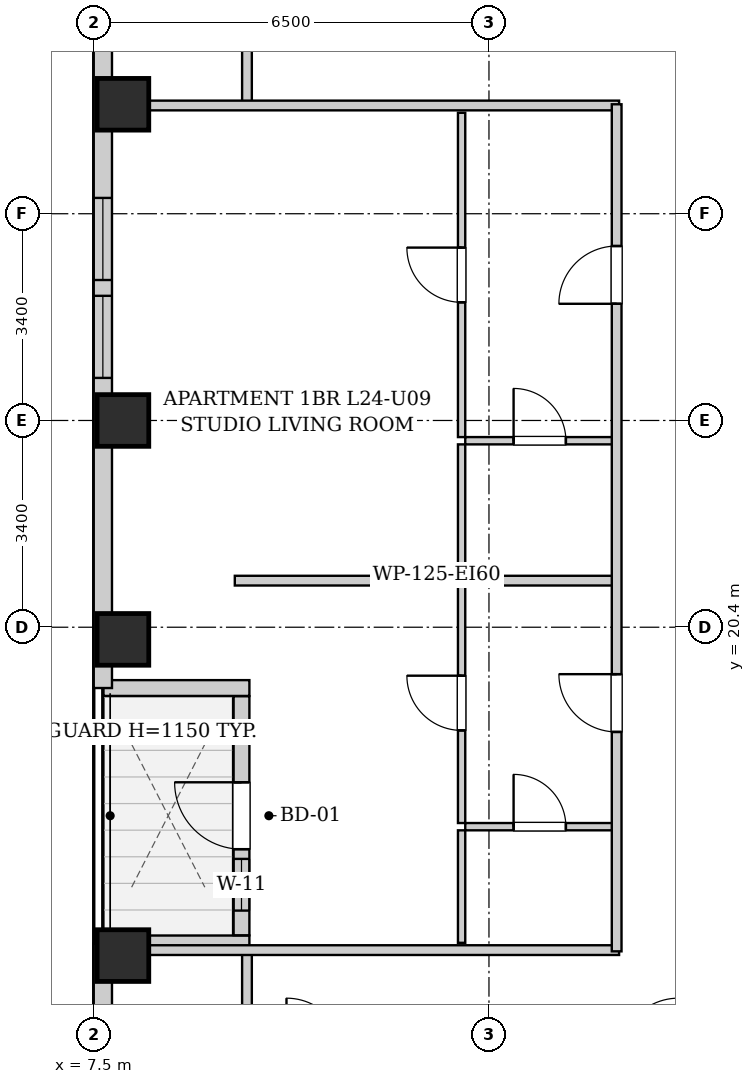
"""IFC4 building model, lengths in metres.
Left out: names, types, materials, properties, quantities, classifications, styles, units other than length and angle.
Written with IfcOpenShell. Run it as: python <this file> out.ifc"""

import sys

from ifc_helpers import new_model, si_unit, direction, frame, frame_2d, origin, origin_2d, place, context, subcontext, project, spatial, rectangle, extrude, element, fill, save


model = new_model("IFC4")
c1 = context("Model", 3, precision=1e-05, world=origin(), true_north=direction((0.0, 1.0)))
c2 = subcontext(c1, "Body", "Model", "MODEL_VIEW")
j1 = project(units=[si_unit("LENGTHUNIT", "METRE"), si_unit("PLANEANGLEUNIT", "RADIAN")], contexts=[c1])
p1 = place(None, origin())
s1 = spatial("IfcSite", under=j1, at=p1, CompositionType="ELEMENT")
p2 = place(p1, origin())
s2 = spatial("IfcBuilding", under=s1, at=p2, CompositionType="ELEMENT")
p3 = place(p2, frame((0.0, 0.0, 87.9)))
s3 = spatial("IfcBuildingStorey", under=s2, at=p3, CompositionType="ELEMENT", Elevation=87.9)
for number, where, z_axis, x_axis in (
    (1, (7.98, 15.0, 0.0), (0.0, 0.0, 1.0), (1.0, 0.0, 0.0)),
    (2, (7.98, 20.2, 0.0), (0.0, 0.0, 1.0), (1.0, 0.0, 0.0)),
    (3, (7.98, 23.8, 0.0), (0.0, 0.0, 1.0), (1.0, 0.0, 0.0)),
    (4, (7.98, 29.0, 0.0), (0.0, 0.0, 1.0), (1.0, 0.0, 0.0)),
):
    element("IfcColumn", number, at=place(p3, frame(where, z_axis=z_axis, x_axis=x_axis)), inside=s3, PredefinedType="COLUMN", context=c2, shape_type="SweptSolid", body=[
        extrude(rectangle(XDim=0.85, YDim=0.85, at=origin_2d()), origin(), (0.0, 0.0, 1.0), 3.2),
    ])
p4 = place(p3, frame((7.65, 2.5, 0.0), z_axis=(0.0, 0.0, 1.0), x_axis=(0.0, 1.0, 0.0)))
e5 = element("IfcWall", 5, at=p4, inside=s3, PredefinedType="SOLIDWALL", context=c2, shape_type="SweptSolid", body=[
    extrude(rectangle(XDim=12.7, YDim=0.3, at=frame_2d((6.35, 0.0))), origin(), (0.0, 0.0, 1.0), 2.94),
])
p5 = place(p4, frame((3.482, 0.0, 0.55)))
e6 = element("IfcOpeningElement", 6, at=p5, cuts=e5, PredefinedType="OPENING", context=c2, shape_type="SweptSolid", body=[
    extrude(rectangle(XDim=1.35, YDim=1.2, at=frame_2d((0.675, 0.6))), frame((0.0, 0.16, 0.0), z_axis=(0.0, -1.0, 0.0), x_axis=(1.0, 0.0, 0.0)), (0.0, 0.0, 1.0), 0.32),
])
p6 = place(p4, frame((1.135, 0.0, 0.55)))
e7 = element("IfcOpeningElement", 7, at=p6, cuts=e5, PredefinedType="OPENING", context=c2, shape_type="SweptSolid", body=[
    extrude(rectangle(XDim=1.35, YDim=1.2, at=frame_2d((0.675, 0.6))), frame((0.0, 0.16, 0.0), z_axis=(0.0, -1.0, 0.0), x_axis=(1.0, 0.0, 0.0)), (0.0, 0.0, 1.0), 0.32),
])
p7 = place(p3, frame((7.66, 15.2, 0.0), z_axis=(0.0, 0.0, 1.0), x_axis=(1.0, 0.0, 0.0)))
e8 = element("IfcWall", 8, at=p7, inside=s3, PredefinedType="SOLIDWALL", context=c2, shape_type="SweptSolid", body=[
    extrude(rectangle(XDim=2.4, YDim=0.26, at=frame_2d((1.2, 0.0))), origin(), (0.0, 0.0, 1.0), 2.94),
])
p8 = place(p3, frame((9.93, 15.334, 0.0), z_axis=(0.0, 0.0, 1.0), x_axis=(0.0, 1.0, 0.0)))
e9 = element("IfcWall", 9, at=p8, inside=s3, PredefinedType="SOLIDWALL", context=c2, shape_type="SweptSolid", body=[
    extrude(rectangle(XDim=3.932, YDim=0.26, at=frame_2d((1.966, 0.0))), origin(), (0.0, 0.0, 1.0), 2.94),
])
p9 = place(p8, frame((1.416, 0.0, 0.0)))
e10 = element("IfcOpeningElement", 10, at=p9, cuts=e9, PredefinedType="OPENING", context=c2, shape_type="SweptSolid", body=[
    extrude(rectangle(XDim=1.1, YDim=2.0, at=frame_2d((0.55, 1.0))), frame((0.0, 0.14, 0.0), z_axis=(0.0, -1.0, 0.0), x_axis=(1.0, 0.0, 0.0)), (0.0, 0.0, 1.0), 0.28),
])
p10 = place(p8, frame((0.406, 0.0, 0.55)))
e11 = element("IfcOpeningElement", 11, at=p10, cuts=e9, PredefinedType="OPENING", context=c2, shape_type="SweptSolid", body=[
    extrude(rectangle(XDim=0.85, YDim=1.2, at=frame_2d((0.425, 0.6))), frame((0.0, 0.14, 0.0), z_axis=(0.0, -1.0, 0.0), x_axis=(1.0, 0.0, 0.0)), (0.0, 0.0, 1.0), 0.28),
])
p11 = place(p3, frame((10.06, 19.4, 0.0), z_axis=(0.0, 0.0, 1.0), x_axis=(-1.0, 0.0, 0.0)))
e12 = element("IfcWall", 12, at=p11, inside=s3, PredefinedType="SOLIDWALL", context=c2, shape_type="SweptSolid", body=[
    extrude(rectangle(XDim=2.4, YDim=0.26, at=frame_2d((1.2, 0.0))), origin(), (0.0, 0.0, 1.0), 2.94),
])
p12 = place(p3, frame((7.65, 19.4, 0.0), z_axis=(0.0, 0.0, 1.0), x_axis=(0.0, 1.0, 0.0)))
e13 = element("IfcWall", 13, at=p12, inside=s3, PredefinedType="SOLIDWALL", context=c2, shape_type="SweptSolid", body=[
    extrude(rectangle(XDim=21.4, YDim=0.3, at=frame_2d((10.7, 0.0))), origin(), (0.0, 0.0, 1.0), 2.94),
])
p13 = place(p12, frame((16.957, 0.0, 0.55)))
e14 = element("IfcOpeningElement", 14, at=p13, cuts=e13, PredefinedType="OPENING", context=c2, shape_type="SweptSolid", body=[
    extrude(rectangle(XDim=1.35, YDim=1.2, at=frame_2d((0.675, 0.6))), frame((0.0, 0.16, 0.0), z_axis=(0.0, -1.0, 0.0), x_axis=(1.0, 0.0, 0.0)), (0.0, 0.0, 1.0), 0.32),
])
p14 = place(p12, frame((15.185, 0.0, 0.55)))
e15 = element("IfcOpeningElement", 15, at=p14, cuts=e13, PredefinedType="OPENING", context=c2, shape_type="SweptSolid", body=[
    extrude(rectangle(XDim=1.35, YDim=1.2, at=frame_2d((0.675, 0.6))), frame((0.0, 0.16, 0.0), z_axis=(0.0, -1.0, 0.0), x_axis=(1.0, 0.0, 0.0)), (0.0, 0.0, 1.0), 0.32),
])
p15 = place(p12, frame((5.1, 0.0, 0.55)))
e16 = element("IfcOpeningElement", 16, at=p15, cuts=e13, PredefinedType="OPENING", context=c2, shape_type="SweptSolid", body=[
    extrude(rectangle(XDim=1.35, YDim=1.2, at=frame_2d((0.675, 0.6))), frame((0.0, 0.16, 0.0), z_axis=(0.0, -1.0, 0.0), x_axis=(1.0, 0.0, 0.0)), (0.0, 0.0, 1.0), 0.32),
])
p16 = place(p12, frame((6.71, 0.0, 0.55)))
e17 = element("IfcOpeningElement", 17, at=p16, cuts=e13, PredefinedType="OPENING", context=c2, shape_type="SweptSolid", body=[
    extrude(rectangle(XDim=1.35, YDim=1.2, at=frame_2d((0.675, 0.6))), frame((0.0, 0.16, 0.0), z_axis=(0.0, -1.0, 0.0), x_axis=(1.0, 0.0, 0.0)), (0.0, 0.0, 1.0), 0.32),
])
for number, where, z_axis, x_axis in (
    (18, (10.02, 13.35, 0.0), (0.0, 0.0, 1.0), (0.0, 1.0, 0.0)),
    (19, (10.02, 28.98, 0.0), (0.0, 0.0, 1.0), (0.0, 1.0, 0.0)),
):
    element("IfcWall", number, at=place(p3, frame(where, z_axis=z_axis, x_axis=x_axis)), inside=s3, PredefinedType="PARTITIONING", context=c2, shape_type="SweptSolid", body=[
        extrude(rectangle(XDim=1.74, YDim=0.16, at=frame_2d((0.87, 0.0))), origin(), (0.0, 0.0, 1.0), 2.94),
    ])
for number, where, z_axis, x_axis in (
    (20, (7.78, 15.09, 0.0), (0.0, 0.0, 1.0), (1.0, 0.0, 0.0)),
    (21, (7.78, 28.98, 0.0), (0.0, 0.0, 1.0), (1.0, 0.0, 0.0)),
):
    element("IfcWall", number, at=place(p3, frame(where, z_axis=z_axis, x_axis=x_axis)), inside=s3, PredefinedType="PARTITIONING", context=c2, shape_type="SweptSolid", body=[
        extrude(rectangle(XDim=8.36, YDim=0.16, at=frame_2d((4.18, 0.0))), origin(), (0.0, 0.0, 1.0), 2.309),
    ])
p17 = place(p3, frame((9.82, 21.166, 0.0), z_axis=(0.0, 0.0, 1.0), x_axis=(1.0, 0.0, 0.0)))
e22 = element("IfcWall", 22, at=p17, inside=s3, PredefinedType="PARTITIONING", context=c2, shape_type="SweptSolid", body=[
    extrude(rectangle(XDim=6.24, YDim=0.16, at=frame_2d((3.12, 0.0))), origin(), (0.0, 0.0, 1.0), 2.94),
])
p18 = place(p3, frame((13.61, 17.12, 0.0), z_axis=(0.0, 0.0, 1.0), x_axis=(1.0, 0.0, 0.0)))
e23 = element("IfcWall", 23, at=p18, inside=s3, PredefinedType="PARTITIONING", context=c2, shape_type="SweptSolid", body=[
    extrude(rectangle(XDim=2.45, YDim=0.12, at=frame_2d((1.225, 0.0))), origin(), (0.0, 0.0, 1.0), 2.94),
])
p19 = place(p18, frame((0.795, 0.0, 0.0)))
e24 = element("IfcOpeningElement", 24, at=p19, cuts=e23, PredefinedType="OPENING", context=c2, shape_type="SweptSolid", body=[
    extrude(rectangle(XDim=0.86, YDim=2.05, at=frame_2d((0.43, 1.025))), frame((0.0, 0.07, 0.0), z_axis=(0.0, -1.0, 0.0), x_axis=(1.0, 0.0, 0.0)), (0.0, 0.0, 1.0), 0.14),
])
p20 = place(p3, frame((13.55, 15.21, 0.0), z_axis=(0.0, 0.0, 1.0), x_axis=(0.0, 1.0, 0.0)))
e25 = element("IfcWall", 25, at=p20, inside=s3, PredefinedType="PARTITIONING", context=c2, shape_type="SweptSolid", body=[
    extrude(rectangle(XDim=1.85, YDim=0.12, at=frame_2d((0.925, 0.0))), origin(), (0.0, 0.0, 1.0), 2.94),
])
p21 = place(p3, frame((13.55, 17.18, 0.0), z_axis=(0.0, 0.0, 1.0), x_axis=(0.0, 1.0, 0.0)))
e26 = element("IfcWall", 26, at=p21, inside=s3, PredefinedType="PARTITIONING", context=c2, shape_type="SweptSolid", body=[
    extrude(rectangle(XDim=3.946, YDim=0.12, at=frame_2d((1.973, 0.0))), origin(), (0.0, 0.0, 1.0), 2.94),
])
p22 = place(p21, frame((1.523, 0.0, 0.0)))
e27 = element("IfcOpeningElement", 27, at=p22, cuts=e26, PredefinedType="OPENING", context=c2, shape_type="SweptSolid", body=[
    extrude(rectangle(XDim=0.9, YDim=2.05, at=frame_2d((0.45, 1.025))), frame((0.0, 0.07, 0.0), z_axis=(0.0, -1.0, 0.0), x_axis=(1.0, 0.0, 0.0)), (0.0, 0.0, 1.0), 0.14),
])
p23 = place(p3, frame((13.61, 23.467, 0.0), z_axis=(0.0, 0.0, 1.0), x_axis=(1.0, 0.0, 0.0)))
e28 = element("IfcWall", 28, at=p23, inside=s3, PredefinedType="PARTITIONING", context=c2, shape_type="SweptSolid", body=[
    extrude(rectangle(XDim=2.45, YDim=0.12, at=frame_2d((1.225, 0.0))), origin(), (0.0, 0.0, 1.0), 2.94),
])
p24 = place(p23, frame((0.795, 0.0, 0.0)))
e29 = element("IfcOpeningElement", 29, at=p24, cuts=e28, PredefinedType="OPENING", context=c2, shape_type="SweptSolid", body=[
    extrude(rectangle(XDim=0.86, YDim=2.05, at=frame_2d((0.43, 1.025))), frame((0.0, 0.07, 0.0), z_axis=(0.0, -1.0, 0.0), x_axis=(1.0, 0.0, 0.0)), (0.0, 0.0, 1.0), 0.14),
])
p25 = place(p3, frame((13.55, 21.286, 0.0), z_axis=(0.0, 0.0, 1.0), x_axis=(0.0, 1.0, 0.0)))
e30 = element("IfcWall", 30, at=p25, inside=s3, PredefinedType="PARTITIONING", context=c2, shape_type="SweptSolid", body=[
    extrude(rectangle(XDim=2.121, YDim=0.12, at=frame_2d((1.061, 0.0))), origin(), (0.0, 0.0, 1.0), 2.94),
])
p26 = place(p3, frame((13.55, 23.527, 0.0), z_axis=(0.0, 0.0, 1.0), x_axis=(0.0, 1.0, 0.0)))
e31 = element("IfcWall", 31, at=p26, inside=s3, PredefinedType="PARTITIONING", context=c2, shape_type="SweptSolid", body=[
    extrude(rectangle(XDim=5.333, YDim=0.12, at=frame_2d((2.667, 0.0))), origin(), (0.0, 0.0, 1.0), 2.94),
])
p27 = place(p26, frame((2.216, 0.0, 0.0)))
e32 = element("IfcOpeningElement", 32, at=p27, cuts=e31, PredefinedType="OPENING", context=c2, shape_type="SweptSolid", body=[
    extrude(rectangle(XDim=0.9, YDim=2.05, at=frame_2d((0.45, 1.025))), frame((0.0, 0.07, 0.0), z_axis=(0.0, -1.0, 0.0), x_axis=(1.0, 0.0, 0.0)), (0.0, 0.0, 1.0), 0.14),
])
p28 = place(p3, frame((16.1, 15.07, 0.0), z_axis=(0.0, 0.0, 1.0), x_axis=(0.0, 1.0, 0.0)))
e33 = element("IfcWall", 33, at=p28, inside=s3, PredefinedType="PARTITIONING", context=c2, shape_type="SweptSolid", body=[
    extrude(rectangle(XDim=13.93, YDim=0.16, at=frame_2d((6.965, 0.0))), origin(), (0.0, 0.0, 1.0), 2.94),
])
p29 = place(p28, frame((3.608, 0.0, 0.0)))
e34 = element("IfcOpeningElement", 34, at=p29, cuts=e33, PredefinedType="OPENING", context=c2, shape_type="SweptSolid", body=[
    extrude(rectangle(XDim=0.95, YDim=2.1, at=frame_2d((0.475, 1.05))), frame((0.0, 0.09, 0.0), z_axis=(0.0, -1.0, 0.0), x_axis=(1.0, 0.0, 0.0)), (0.0, 0.0, 1.0), 0.18),
])
p30 = place(p28, frame((10.649, 0.0, 0.0)))
e35 = element("IfcOpeningElement", 35, at=p30, cuts=e33, PredefinedType="OPENING", context=c2, shape_type="SweptSolid", body=[
    extrude(rectangle(XDim=0.95, YDim=2.1, at=frame_2d((0.475, 1.05))), frame((0.0, 0.09, 0.0), z_axis=(0.0, -1.0, 0.0), x_axis=(1.0, 0.0, 0.0)), (0.0, 0.0, 1.0), 0.18),
])
p31 = place(p19, origin())
e36 = element("IfcDoor", 36, at=p31, inside=s3, OperationType="SINGLE_SWING_LEFT", PredefinedType="DOOR", context=c2, shape_type="SweptSolid", body=[
    extrude(rectangle(XDim=0.86, YDim=2.05, at=frame_2d((0.43, 1.025))), frame((0.0, 0.025, 0.0), z_axis=(0.0, -1.0, 0.0), x_axis=(1.0, 0.0, 0.0)), (0.0, 0.0, 1.0), 0.05),
])
fill(e24, e36)
p32 = place(p22, origin())
e37 = element("IfcDoor", 37, at=p32, inside=s3, OperationType="SINGLE_SWING_RIGHT", PredefinedType="DOOR", context=c2, shape_type="SweptSolid", body=[
    extrude(rectangle(XDim=0.9, YDim=2.05, at=frame_2d((0.45, 1.025))), frame((0.0, 0.025, 0.0), z_axis=(0.0, -1.0, 0.0), x_axis=(1.0, 0.0, 0.0)), (0.0, 0.0, 1.0), 0.05),
])
fill(e27, e37)
p33 = place(p24, origin())
e38 = element("IfcDoor", 38, at=p33, inside=s3, OperationType="SINGLE_SWING_LEFT", PredefinedType="DOOR", context=c2, shape_type="SweptSolid", body=[
    extrude(rectangle(XDim=0.86, YDim=2.05, at=frame_2d((0.43, 1.025))), frame((0.0, 0.025, 0.0), z_axis=(0.0, -1.0, 0.0), x_axis=(1.0, 0.0, 0.0)), (0.0, 0.0, 1.0), 0.05),
])
fill(e29, e38)
p34 = place(p27, origin())
e39 = element("IfcDoor", 39, at=p34, inside=s3, OperationType="SINGLE_SWING_RIGHT", PredefinedType="DOOR", context=c2, shape_type="SweptSolid", body=[
    extrude(rectangle(XDim=0.9, YDim=2.05, at=frame_2d((0.45, 1.025))), frame((0.0, 0.025, 0.0), z_axis=(0.0, -1.0, 0.0), x_axis=(1.0, 0.0, 0.0)), (0.0, 0.0, 1.0), 0.05),
])
fill(e32, e39)
p35 = place(p29, origin())
e40 = element("IfcDoor", 40, at=p35, inside=s3, OperationType="SINGLE_SWING_RIGHT", PredefinedType="DOOR", context=c2, shape_type="SweptSolid", body=[
    extrude(rectangle(XDim=0.95, YDim=2.1, at=frame_2d((0.475, 1.05))), frame((0.0, 0.025, 0.0), z_axis=(0.0, -1.0, 0.0), x_axis=(1.0, 0.0, 0.0)), (0.0, 0.0, 1.0), 0.05),
])
fill(e34, e40)
p36 = place(p30, origin())
e41 = element("IfcDoor", 41, at=p36, inside=s3, OperationType="SINGLE_SWING_LEFT", PredefinedType="DOOR", context=c2, shape_type="SweptSolid", body=[
    extrude(rectangle(XDim=0.95, YDim=2.1, at=frame_2d((0.475, 1.05))), frame((0.0, 0.025, 0.0), z_axis=(0.0, -1.0, 0.0), x_axis=(1.0, 0.0, 0.0)), (0.0, 0.0, 1.0), 0.05),
])
fill(e35, e41)
p37 = place(p9, origin())
e42 = element("IfcDoor", 42, at=p37, inside=s3, OperationType="SINGLE_SWING_RIGHT", PredefinedType="DOOR", context=c2, shape_type="SweptSolid", body=[
    extrude(rectangle(XDim=1.1, YDim=2.0, at=frame_2d((0.55, 1.0))), frame((0.0, 0.025, 0.0), z_axis=(0.0, -1.0, 0.0), x_axis=(1.0, 0.0, 0.0)), (0.0, 0.0, 1.0), 0.05),
])
fill(e10, e42)
p38 = place(p10, origin())
e43 = element("IfcWindow", 43, at=p38, inside=s3, PartitioningType="SINGLE_PANEL", PredefinedType="WINDOW", context=c2, shape_type="SweptSolid", body=[
    extrude(rectangle(XDim=0.85, YDim=1.2, at=frame_2d((0.425, 0.6))), frame((0.0, 0.03, 0.0), z_axis=(0.0, -1.0, 0.0), x_axis=(1.0, 0.0, 0.0)), (0.0, 0.0, 1.0), 0.06),
])
fill(e11, e43)
p39 = place(p15, origin())
e44 = element("IfcWindow", 44, at=p39, inside=s3, PartitioningType="SINGLE_PANEL", PredefinedType="WINDOW", context=c2, shape_type="SweptSolid", body=[
    extrude(rectangle(XDim=1.35, YDim=1.2, at=frame_2d((0.675, 0.6))), frame((0.0, 0.03, 0.0), z_axis=(0.0, -1.0, 0.0), x_axis=(1.0, 0.0, 0.0)), (0.0, 0.0, 1.0), 0.06),
])
fill(e16, e44)
p40 = place(p16, origin())
e45 = element("IfcWindow", 45, at=p40, inside=s3, PartitioningType="SINGLE_PANEL", PredefinedType="WINDOW", context=c2, shape_type="SweptSolid", body=[
    extrude(rectangle(XDim=1.35, YDim=1.2, at=frame_2d((0.675, 0.6))), frame((0.0, 0.03, 0.0), z_axis=(0.0, -1.0, 0.0), x_axis=(1.0, 0.0, 0.0)), (0.0, 0.0, 1.0), 0.06),
])
fill(e17, e45)
save(model, sys.argv[1])
